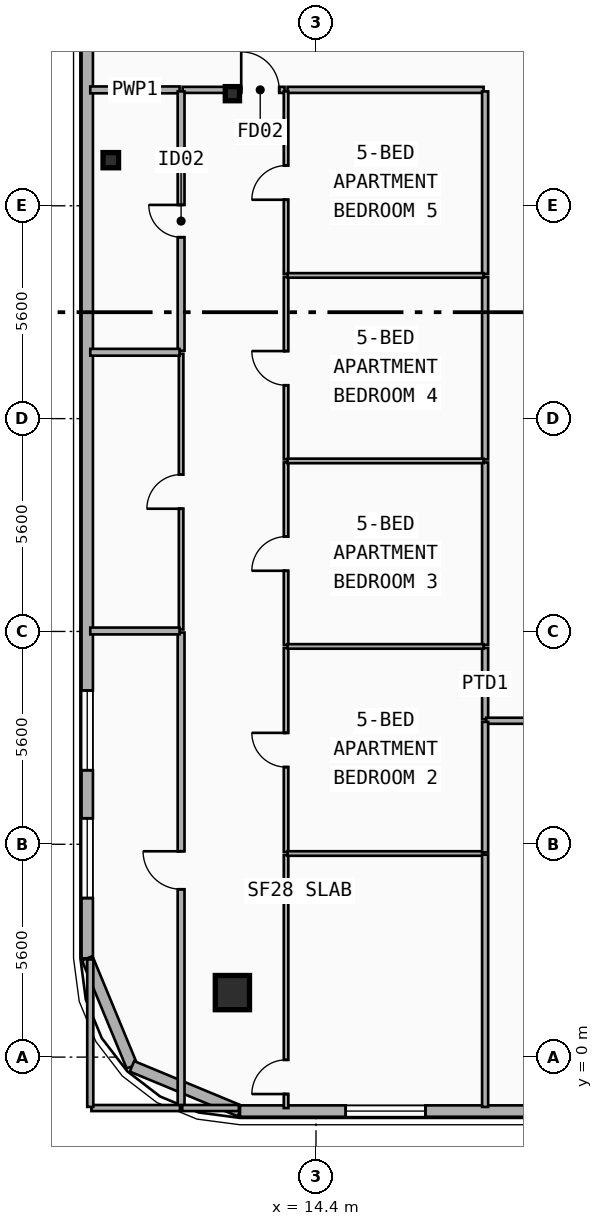
"""IFC4 building model, lengths in metres.
Left out: names, types, materials, properties, quantities, classifications, styles, units other than length and angle.
Written with IfcOpenShell. Run it as: python <this file> out.ifc"""

import sys

from ifc_helpers import new_model, si_unit, direction, frame, frame_2d, origin, origin_2d, place, context, subcontext, project, spatial, rectangle, i_section, extrude, element, fill, save


model = new_model("IFC4")
c1 = context("Model", 3, precision=1e-05, world=origin(), true_north=direction((0.0, 1.0)))
c2 = subcontext(c1, "Body", "Model", "MODEL_VIEW")
j1 = project(units=[si_unit("LENGTHUNIT", "METRE"), si_unit("PLANEANGLEUNIT", "RADIAN")], contexts=[c1])
p1 = place(None, origin())
s1 = spatial("IfcSite", under=j1, at=p1, CompositionType="ELEMENT")
p2 = place(p1, origin())
s2 = spatial("IfcBuilding", under=s1, at=p2, CompositionType="ELEMENT")
p3 = place(p2, frame((0.0, 0.0, 269.5)))
s3 = spatial("IfcBuildingStorey", under=s2, at=p3, CompositionType="ELEMENT", Elevation=269.5)
p4 = place(p3, frame((12.2, 25.35, 0.0), z_axis=(0.0, 0.0, 1.0), x_axis=(1.0, 0.0, 0.0)))
e1 = element("IfcColumn", 1, at=p4, inside=s3, PredefinedType="COLUMN", context=c2, shape_type="SweptSolid", body=[
    extrude(i_section(OverallWidth=0.374, OverallDepth=0.372, WebThickness=0.017, FlangeThickness=0.027, FilletRadius=0.015, at=origin_2d()), origin(), (0.0, 0.0, 1.0), 3.7),
])
p5 = place(p3, frame((12.2, 1.806, 0.0), z_axis=(0.0, -0.090227632116, 0.995921168769), x_axis=(1.0, 0.0, 0.0)))
e2 = element("IfcColumn", 2, at=p5, inside=s3, PredefinedType="COLUMN", context=c2, shape_type="SweptSolid", body=[
    extrude(rectangle(XDim=0.9, YDim=0.9, at=origin_2d()), origin(), (0.0, 0.0, 1.0), 3.715),
])
p6 = place(p3, frame((9.0, 23.6, 0.0), z_axis=(0.0, 0.0, 1.0), x_axis=(1.0, 0.0, 0.0)))
e3 = element("IfcColumn", 3, at=p6, inside=s3, PredefinedType="COLUMN", context=c2, shape_type="SweptSolid", body=[
    extrude(i_section(OverallWidth=0.408, OverallDepth=0.4, WebThickness=0.025, FlangeThickness=0.039, FilletRadius=0.015, at=origin_2d()), origin(), (0.0, 0.0, 1.0), 3.7),
])
p7 = place(p3, frame((8.38, 2.6, 0.0), z_axis=(0.0, 0.0, 1.0), x_axis=(0.0, 1.0, 0.0)))
e4 = element("IfcWall", 4, at=p7, inside=s3, PredefinedType="SOLIDWALL", context=c2, shape_type="SweptSolid", body=[
    extrude(rectangle(XDim=34.2, YDim=0.3, at=frame_2d((17.1, 0.0))), origin(), (0.0, 0.0, 1.0), 3.42),
])
p8 = place(p7, frame((1.584, 0.0, 0.75)))
e5 = element("IfcOpeningElement", 5, at=p8, cuts=e4, PredefinedType="OPENING", context=c2, shape_type="SweptSolid", body=[
    extrude(rectangle(XDim=2.1, YDim=2.1, at=frame_2d((1.05, 1.05))), frame((0.0, 0.16, 0.0), z_axis=(0.0, -1.0, 0.0), x_axis=(1.0, 0.0, 0.0)), (0.0, 0.0, 1.0), 0.32),
])
p9 = place(p7, frame((4.948, 0.0, 0.75)))
e6 = element("IfcOpeningElement", 6, at=p9, cuts=e4, PredefinedType="OPENING", context=c2, shape_type="SweptSolid", body=[
    extrude(rectangle(XDim=2.1, YDim=2.1, at=frame_2d((1.05, 1.05))), frame((0.0, 0.16, 0.0), z_axis=(0.0, -1.0, 0.0), x_axis=(1.0, 0.0, 0.0)), (0.0, 0.0, 1.0), 0.32),
])
p10 = place(p3, frame((9.557, -0.243, 0.0), z_axis=(0.0, 0.0, 1.0), x_axis=(-0.382676475685, 0.923882414032, 0.0)))
e7 = element("IfcWall", 7, at=p10, inside=s3, PredefinedType="SOLIDWALL", context=c2, shape_type="SweptSolid", body=[
    extrude(rectangle(XDim=3.077, YDim=0.3, at=frame_2d((1.539, 0.0))), origin(), (0.0, 0.0, 1.0), 3.42),
])
p11 = place(p3, frame((12.4, -1.42, 0.0), z_axis=(0.0, 0.0, 1.0), x_axis=(-0.92389884758, 0.382636798336, 0.0)))
e8 = element("IfcWall", 8, at=p11, inside=s3, PredefinedType="SOLIDWALL", context=c2, shape_type="SweptSolid", body=[
    extrude(rectangle(XDim=3.077, YDim=0.3, at=frame_2d((1.538, 0.0))), origin(), (0.0, 0.0, 1.0), 3.42),
])
p12 = place(p3, frame((45.2, -1.42, 0.0), z_axis=(0.0, 0.0, 1.0), x_axis=(-1.0, 0.0, 0.0)))
e9 = element("IfcWall", 9, at=p12, inside=s3, PredefinedType="SOLIDWALL", context=c2, shape_type="SweptSolid", body=[
    extrude(rectangle(XDim=32.8, YDim=0.3, at=frame_2d((16.4, 0.0))), origin(), (0.0, 0.0, 1.0), 3.42),
])
p13 = place(p12, frame((27.919, 0.0, 0.75)))
e10 = element("IfcOpeningElement", 10, at=p13, cuts=e9, PredefinedType="OPENING", context=c2, shape_type="SweptSolid", body=[
    extrude(rectangle(XDim=2.1, YDim=2.1, at=frame_2d((1.05, 1.05))), frame((0.0, 0.16, 0.0), z_axis=(0.0, -1.0, 0.0), x_axis=(1.0, 0.0, 0.0)), (0.0, 0.0, 1.0), 0.32),
])
p14 = place(p12, frame((15.75, 0.0, 0.75)))
e11 = element("IfcOpeningElement", 11, at=p14, cuts=e9, PredefinedType="OPENING", context=c2, shape_type="SweptSolid", body=[
    extrude(rectangle(XDim=2.1, YDim=2.1, at=frame_2d((1.05, 1.05))), frame((0.0, 0.16, 0.0), z_axis=(0.0, -1.0, 0.0), x_axis=(1.0, 0.0, 0.0)), (0.0, 0.0, 1.0), 0.32),
])
p15 = place(p12, frame((0.41, 0.0, 0.68)))
e12 = element("IfcOpeningElement", 12, at=p15, cuts=e9, PredefinedType="OPENING", context=c2, shape_type="SweptSolid", body=[
    extrude(rectangle(XDim=1.2, YDim=1.5, at=frame_2d((0.6, 0.75))), frame((0.0, 0.16, 0.0), z_axis=(0.0, -1.0, 0.0), x_axis=(1.0, 0.0, 0.0)), (0.0, 0.0, 1.0), 0.32),
])
p16 = place(p3, frame((10.89, 25.45, 0.0), z_axis=(0.0, 0.0, 1.0), x_axis=(1.0, 0.0, 0.0)))
e13 = element("IfcWall", 13, at=p16, inside=s3, PredefinedType="PARTITIONING", context=c2, shape_type="SweptSolid", body=[
    extrude(rectangle(XDim=2.682, YDim=0.16, at=frame_2d((1.341, 0.0))), origin(), (0.0, 0.0, 1.0), 2.7),
])
p17 = place(p16, frame((1.542, 0.0, 0.0)))
e14 = element("IfcOpeningElement", 14, at=p17, cuts=e13, PredefinedType="OPENING", context=c2, shape_type="SweptSolid", body=[
    extrude(rectangle(XDim=1.0, YDim=2.15, at=frame_2d((0.5, 1.075))), frame((0.0, 0.09, 0.0), z_axis=(0.0, -1.0, 0.0), x_axis=(1.0, 0.0, 0.0)), (0.0, 0.0, 1.0), 0.18),
])
p18 = place(p3, frame((8.46, 25.45, 0.0), z_axis=(0.0, 0.0, 1.0), x_axis=(1.0, 0.0, 0.0)))
e15 = element("IfcWall", 15, at=p18, inside=s3, PredefinedType="PLUMBINGWALL", context=c2, shape_type="SweptSolid", body=[
    extrude(rectangle(XDim=2.35, YDim=0.18, at=frame_2d((1.175, 0.0))), origin(), (0.0, 0.0, 1.0), 3.42),
])
p19 = place(p3, frame((13.652, 25.45, 0.0), z_axis=(0.0, 0.0, 1.0), x_axis=(1.0, 0.0, 0.0)))
e16 = element("IfcWall", 16, at=p19, inside=s3, PredefinedType="PARTITIONING", context=c2, shape_type="SweptSolid", body=[
    extrude(rectangle(XDim=5.158, YDim=0.16, at=frame_2d((2.579, 0.0))), origin(), (0.0, 0.0, 1.0), 3.42),
])
p20 = place(p3, frame((18.85, 8.89, 0.0), z_axis=(0.0, 0.0, 1.0), x_axis=(0.0, 1.0, 0.0)))
e17 = element("IfcWall", 17, at=p20, inside=s3, PredefinedType="PARTITIONING", context=c2, shape_type="SweptSolid", body=[
    extrude(rectangle(XDim=1.876, YDim=0.16, at=frame_2d((0.938, 0.0))), origin(), (0.0, 0.0, 1.0), 3.09),
])
p21 = place(p3, frame((18.85, 10.846, 0.0), z_axis=(0.0, 0.0, 1.0), x_axis=(0.0, 1.0, 0.0)))
e18 = element("IfcWall", 18, at=p21, inside=s3, PredefinedType="PARTITIONING", context=c2, shape_type="SweptSolid", body=[
    extrude(rectangle(XDim=4.801, YDim=0.16, at=frame_2d((2.4, 0.0))), origin(), (0.0, 0.0, 1.0), 2.96),
])
p22 = place(p3, frame((18.85, 15.727, 0.0), z_axis=(0.0, 0.0, 1.0), x_axis=(0.0, 1.0, 0.0)))
e19 = element("IfcWall", 19, at=p22, inside=s3, PredefinedType="PARTITIONING", context=c2, shape_type="SweptSolid", body=[
    extrude(rectangle(XDim=4.801, YDim=0.16, at=frame_2d((2.4, 0.0))), origin(), (0.0, 0.0, 1.0), 3.09),
])
p23 = place(p3, frame((18.85, 20.608, 0.0), z_axis=(0.0, 0.0, 1.0), x_axis=(0.0, 1.0, 0.0)))
e20 = element("IfcWall", 20, at=p23, inside=s3, PredefinedType="PARTITIONING", context=c2, shape_type="SweptSolid", body=[
    extrude(rectangle(XDim=4.802, YDim=0.16, at=frame_2d((2.401, 0.0))), origin(), (0.0, 0.0, 1.0), 2.96),
])
p24 = place(p3, frame((10.85, -1.34, 0.0), z_axis=(0.0, 0.0, 1.0), x_axis=(0.0, 1.0, 0.0)))
e21 = element("IfcWall", 21, at=p24, inside=s3, PredefinedType="PLUMBINGWALL", context=c2, shape_type="SweptSolid", body=[
    extrude(rectangle(XDim=12.512, YDim=0.18, at=frame_2d((6.256, 0.0))), origin(), (0.0, 0.0, 1.0), 3.42),
])
p25 = place(p24, frame((5.756, 0.0, 0.0)))
e22 = element("IfcOpeningElement", 22, at=p25, cuts=e21, PredefinedType="OPENING", context=c2, shape_type="SweptSolid", body=[
    extrude(rectangle(XDim=1.0, YDim=2.15, at=frame_2d((0.5, 1.075))), frame((0.0, 0.1, 0.0), z_axis=(0.0, -1.0, 0.0), x_axis=(1.0, 0.0, 0.0)), (0.0, 0.0, 1.0), 0.2),
])
p26 = place(p3, frame((10.85, 11.252, 0.0), z_axis=(0.0, 0.0, 1.0), x_axis=(0.0, 1.0, 0.0)))
e23 = element("IfcWall", 23, at=p26, inside=s3, PredefinedType="PARTITIONING", context=c2, shape_type="SweptSolid", body=[
    extrude(rectangle(XDim=7.254, YDim=0.12, at=frame_2d((3.627, 0.0))), origin(), (0.0, 0.0, 1.0), 3.42),
])
p27 = place(p26, frame((3.177, 0.0, 0.0)))
e24 = element("IfcOpeningElement", 24, at=p27, cuts=e23, PredefinedType="OPENING", context=c2, shape_type="SweptSolid", body=[
    extrude(rectangle(XDim=0.9, YDim=2.1, at=frame_2d((0.45, 1.05))), frame((0.0, 0.07, 0.0), z_axis=(0.0, -1.0, 0.0), x_axis=(1.0, 0.0, 0.0)), (0.0, 0.0, 1.0), 0.14),
])
p28 = place(p3, frame((10.85, 18.586, 0.0), z_axis=(0.0, 0.0, 1.0), x_axis=(0.0, 1.0, 0.0)))
e25 = element("IfcWall", 25, at=p28, inside=s3, PredefinedType="PLUMBINGWALL", context=c2, shape_type="SweptSolid", body=[
    extrude(rectangle(XDim=6.824, YDim=0.18, at=frame_2d((3.412, 0.0))), origin(), (0.0, 0.0, 1.0), 2.9),
])
p29 = place(p28, frame((2.987, 0.0, 0.0)))
e26 = element("IfcOpeningElement", 26, at=p29, cuts=e25, PredefinedType="OPENING", context=c2, shape_type="SweptSolid", body=[
    extrude(rectangle(XDim=0.85, YDim=2.1, at=frame_2d((0.425, 1.05))), frame((0.0, 0.1, 0.0), z_axis=(0.0, -1.0, 0.0), x_axis=(1.0, 0.0, 0.0)), (0.0, 0.0, 1.0), 0.2),
])
p30 = place(p3, frame((13.612, -1.34, 0.0), z_axis=(0.0, 0.0, 1.0), x_axis=(0.0, 1.0, 0.0)))
e27 = element("IfcWall", 27, at=p30, inside=s3, PredefinedType="PARTITIONING", context=c2, shape_type="SweptSolid", body=[
    extrude(rectangle(XDim=6.657, YDim=0.12, at=frame_2d((3.329, 0.0))), origin(), (0.0, 0.0, 1.0), 2.96),
])
p31 = place(p30, frame((0.368, 0.0, 0.0)))
e28 = element("IfcOpeningElement", 28, at=p31, cuts=e27, PredefinedType="OPENING", context=c2, shape_type="SweptSolid", body=[
    extrude(rectangle(XDim=0.9, YDim=2.1, at=frame_2d((0.45, 1.05))), frame((0.0, 0.07, 0.0), z_axis=(0.0, -1.0, 0.0), x_axis=(1.0, 0.0, 0.0)), (0.0, 0.0, 1.0), 0.14),
])
p32 = place(p3, frame((13.612, 5.397, 0.0), z_axis=(0.0, 0.0, 1.0), x_axis=(0.0, 1.0, 0.0)))
e29 = element("IfcWall", 29, at=p32, inside=s3, PredefinedType="PARTITIONING", context=c2, shape_type="SweptSolid", body=[
    extrude(rectangle(XDim=5.369, YDim=0.12, at=frame_2d((2.685, 0.0))), origin(), (0.0, 0.0, 1.0), 2.96),
])
p33 = place(p32, frame((2.235, 0.0, 0.0)))
e30 = element("IfcOpeningElement", 30, at=p33, cuts=e29, PredefinedType="OPENING", context=c2, shape_type="SweptSolid", body=[
    extrude(rectangle(XDim=0.9, YDim=2.1, at=frame_2d((0.45, 1.05))), frame((0.0, 0.07, 0.0), z_axis=(0.0, -1.0, 0.0), x_axis=(1.0, 0.0, 0.0)), (0.0, 0.0, 1.0), 0.14),
])
p34 = place(p3, frame((13.612, 10.846, 0.0), z_axis=(0.0, 0.0, 1.0), x_axis=(0.0, 1.0, 0.0)))
e31 = element("IfcWall", 31, at=p34, inside=s3, PredefinedType="PARTITIONING", context=c2, shape_type="SweptSolid", body=[
    extrude(rectangle(XDim=4.801, YDim=0.12, at=frame_2d((2.4, 0.0))), origin(), (0.0, 0.0, 1.0), 2.96),
])
p35 = place(p34, frame((1.95, 0.0, 0.0)))
e32 = element("IfcOpeningElement", 32, at=p35, cuts=e31, PredefinedType="OPENING", context=c2, shape_type="SweptSolid", body=[
    extrude(rectangle(XDim=0.9, YDim=2.1, at=frame_2d((0.45, 1.05))), frame((0.0, 0.07, 0.0), z_axis=(0.0, -1.0, 0.0), x_axis=(1.0, 0.0, 0.0)), (0.0, 0.0, 1.0), 0.14),
])
p36 = place(p3, frame((13.612, 15.727, 0.0), z_axis=(0.0, 0.0, 1.0), x_axis=(0.0, 1.0, 0.0)))
e33 = element("IfcWall", 33, at=p36, inside=s3, PredefinedType="PARTITIONING", context=c2, shape_type="SweptSolid", body=[
    extrude(rectangle(XDim=4.801, YDim=0.12, at=frame_2d((2.4, 0.0))), origin(), (0.0, 0.0, 1.0), 3.09),
])
p37 = place(p36, frame((1.95, 0.0, 0.0)))
e34 = element("IfcOpeningElement", 34, at=p37, cuts=e33, PredefinedType="OPENING", context=c2, shape_type="SweptSolid", body=[
    extrude(rectangle(XDim=0.9, YDim=2.1, at=frame_2d((0.45, 1.05))), frame((0.0, 0.07, 0.0), z_axis=(0.0, -1.0, 0.0), x_axis=(1.0, 0.0, 0.0)), (0.0, 0.0, 1.0), 0.14),
])
p38 = place(p3, frame((13.612, 20.608, 0.0), z_axis=(0.0, 0.0, 1.0), x_axis=(0.0, 1.0, 0.0)))
e35 = element("IfcWall", 35, at=p38, inside=s3, PredefinedType="PARTITIONING", context=c2, shape_type="SweptSolid", body=[
    extrude(rectangle(XDim=4.802, YDim=0.12, at=frame_2d((2.401, 0.0))), origin(), (0.0, 0.0, 1.0), 2.96),
])
p39 = place(p38, frame((1.951, 0.0, 0.0)))
e36 = element("IfcOpeningElement", 36, at=p39, cuts=e35, PredefinedType="OPENING", context=c2, shape_type="SweptSolid", body=[
    extrude(rectangle(XDim=0.9, YDim=2.1, at=frame_2d((0.45, 1.05))), frame((0.0, 0.07, 0.0), z_axis=(0.0, -1.0, 0.0), x_axis=(1.0, 0.0, 0.0)), (0.0, 0.0, 1.0), 0.14),
])
for number, where, z_axis, x_axis in (
    (37, (8.46, 11.212, 0.0), (0.0, 0.0, 1.0), (1.0, 0.0, 0.0)),
    (38, (8.46, 18.546, 0.0), (0.0, 0.0, 1.0), (1.0, 0.0, 0.0)),
):
    element("IfcWall", number, at=place(p3, frame(where, z_axis=z_axis, x_axis=x_axis)), inside=s3, PredefinedType="PLUMBINGWALL", context=c2, shape_type="SweptSolid", body=[
        extrude(rectangle(XDim=2.35, YDim=0.18, at=frame_2d((1.175, 0.0))), origin(), (0.0, 0.0, 1.0), 3.42),
    ])
p40 = place(p3, frame((13.652, 5.357, 0.0), z_axis=(0.0, 0.0, 1.0), x_axis=(1.0, 0.0, 0.0)))
e39 = element("IfcWall", 39, at=p40, inside=s3, PredefinedType="PARTITIONING", context=c2, shape_type="SweptSolid", body=[
    extrude(rectangle(XDim=5.158, YDim=0.12, at=frame_2d((2.579, 0.0))), origin(), (0.0, 0.0, 1.0), 2.96),
])
for number, where, z_axis, x_axis in (
    (40, (13.652, 10.806, 0.0), (0.0, 0.0, 1.0), (1.0, 0.0, 0.0)),
    (41, (13.652, 15.687, 0.0), (0.0, 0.0, 1.0), (1.0, 0.0, 0.0)),
    (42, (13.652, 20.568, 0.0), (0.0, 0.0, 1.0), (1.0, 0.0, 0.0)),
):
    element("IfcWall", number, at=place(p3, frame(where, z_axis=z_axis, x_axis=x_axis)), inside=s3, PredefinedType="PARTITIONING", context=c2, shape_type="SweptSolid", body=[
        extrude(rectangle(XDim=5.158, YDim=0.12, at=frame_2d((2.579, 0.0))), origin(), (0.0, 0.0, 1.0), 3.42),
    ])
p41 = place(p3, frame((18.88, 8.85, 0.0), z_axis=(0.0, 0.0, 1.0), x_axis=(1.0, 0.0, 0.0)))
e43 = element("IfcWall", 43, at=p41, inside=s3, PredefinedType="PARTITIONING", context=c2, shape_type="SweptSolid", body=[
    extrude(rectangle(XDim=1.54, YDim=0.16, at=frame_2d((0.77, 0.0))), origin(), (0.0, 0.0, 1.0), 3.42),
])
p42 = place(p3, frame((10.88, -1.34, 0.0), z_axis=(0.0, 0.0, 1.0), x_axis=(1.0, 0.0, 0.0)))
e44 = element("IfcWall", 44, at=p42, inside=s3, PredefinedType="PARTITIONING", context=c2, shape_type="SweptSolid", body=[
    extrude(rectangle(XDim=1.49, YDim=0.16, at=frame_2d((0.745, 0.0))), origin(), (0.0, 0.0, 1.0), 3.42),
])
p43 = place(p3, frame((8.49, -1.34, 0.0), z_axis=(0.0, 0.0, 1.0), x_axis=(1.0, 0.0, 0.0)))
e45 = element("IfcWall", 45, at=p43, inside=s3, PredefinedType="PARTITIONING", context=c2, shape_type="SweptSolid", body=[
    extrude(rectangle(XDim=2.33, YDim=0.16, at=frame_2d((1.165, 0.0))), origin(), (0.0, 0.0, 1.0), 3.42),
])
p44 = place(p3, frame((8.46, -1.31, 0.0), z_axis=(0.0, 0.0, 1.0), x_axis=(0.0, 1.0, 0.0)))
e46 = element("IfcWall", 46, at=p44, inside=s3, PredefinedType="PARTITIONING", context=c2, shape_type="SweptSolid", body=[
    extrude(rectangle(XDim=3.88, YDim=0.16, at=frame_2d((1.94, 0.0))), origin(), (0.0, 0.0, 1.0), 3.42),
])
p45 = place(p3, frame((18.85, -1.31, 0.0), z_axis=(0.0, 0.0, 1.0), x_axis=(0.0, 1.0, 0.0)))
e47 = element("IfcWall", 47, at=p45, inside=s3, PredefinedType="PARTITIONING", context=c2, shape_type="SweptSolid", body=[
    extrude(rectangle(XDim=6.637, YDim=0.16, at=frame_2d((3.318, 0.0))), origin(), (0.0, 0.0, 1.0), 2.96),
])
p46 = place(p3, frame((18.85, 5.387, 0.0), z_axis=(0.0, 0.0, 1.0), x_axis=(0.0, 1.0, 0.0)))
e48 = element("IfcWall", 48, at=p46, inside=s3, PredefinedType="PARTITIONING", context=c2, shape_type="SweptSolid", body=[
    extrude(rectangle(XDim=3.433, YDim=0.16, at=frame_2d((1.717, 0.0))), origin(), (0.0, 0.0, 1.0), 2.96),
])
p47 = place(p8, origin())
e49 = element("IfcWindow", 49, at=p47, inside=s3, PartitioningType="SINGLE_PANEL", PredefinedType="WINDOW", context=c2, shape_type="SweptSolid", body=[
    extrude(rectangle(XDim=2.1, YDim=2.1, at=frame_2d((1.05, 1.05))), frame((0.0, 0.03, 0.0), z_axis=(0.0, -1.0, 0.0), x_axis=(1.0, 0.0, 0.0)), (0.0, 0.0, 1.0), 0.06),
])
fill(e5, e49)
p48 = place(p9, origin())
e50 = element("IfcWindow", 50, at=p48, inside=s3, PartitioningType="SINGLE_PANEL", PredefinedType="WINDOW", context=c2, shape_type="SweptSolid", body=[
    extrude(rectangle(XDim=2.1, YDim=2.1, at=frame_2d((1.05, 1.05))), frame((0.0, 0.03, 0.0), z_axis=(0.0, -1.0, 0.0), x_axis=(1.0, 0.0, 0.0)), (0.0, 0.0, 1.0), 0.06),
])
fill(e6, e50)
p49 = place(p13, origin())
e51 = element("IfcWindow", 51, at=p49, inside=s3, PartitioningType="SINGLE_PANEL", PredefinedType="WINDOW", context=c2, shape_type="SweptSolid", body=[
    extrude(rectangle(XDim=2.1, YDim=2.1, at=frame_2d((1.05, 1.05))), frame((0.0, 0.03, 0.0), z_axis=(0.0, -1.0, 0.0), x_axis=(1.0, 0.0, 0.0)), (0.0, 0.0, 1.0), 0.06),
])
fill(e10, e51)
p50 = place(p17, origin())
e52 = element("IfcDoor", 52, at=p50, inside=s3, OperationType="SINGLE_SWING_LEFT", PredefinedType="DOOR", context=c2, shape_type="SweptSolid", body=[
    extrude(rectangle(XDim=1.0, YDim=2.15, at=frame_2d((0.5, 1.075))), frame((0.0, 0.025, 0.0), z_axis=(0.0, -1.0, 0.0), x_axis=(1.0, 0.0, 0.0)), (0.0, 0.0, 1.0), 0.05),
])
fill(e14, e52)
p51 = place(p25, origin())
e53 = element("IfcDoor", 53, at=p51, inside=s3, OperationType="SINGLE_SWING_RIGHT", PredefinedType="DOOR", context=c2, shape_type="SweptSolid", body=[
    extrude(rectangle(XDim=1.0, YDim=2.15, at=frame_2d((0.5, 1.075))), frame((0.0, 0.025, 0.0), z_axis=(0.0, -1.0, 0.0), x_axis=(1.0, 0.0, 0.0)), (0.0, 0.0, 1.0), 0.05),
])
fill(e22, e53)
p52 = place(p27, origin())
e54 = element("IfcDoor", 54, at=p52, inside=s3, OperationType="SINGLE_SWING_LEFT", PredefinedType="DOOR", context=c2, shape_type="SweptSolid", body=[
    extrude(rectangle(XDim=0.9, YDim=2.1, at=frame_2d((0.45, 1.05))), frame((0.0, 0.025, 0.0), z_axis=(0.0, -1.0, 0.0), x_axis=(1.0, 0.0, 0.0)), (0.0, 0.0, 1.0), 0.05),
])
fill(e24, e54)
p53 = place(p29, origin())
e55 = element("IfcDoor", 55, at=p53, inside=s3, OperationType="SINGLE_SWING_RIGHT", PredefinedType="DOOR", context=c2, shape_type="SweptSolid", body=[
    extrude(rectangle(XDim=0.85, YDim=2.1, at=frame_2d((0.425, 1.05))), frame((0.0, 0.025, 0.0), z_axis=(0.0, -1.0, 0.0), x_axis=(1.0, 0.0, 0.0)), (0.0, 0.0, 1.0), 0.05),
])
fill(e26, e55)
p54 = place(p31, origin())
e56 = element("IfcDoor", 56, at=p54, inside=s3, OperationType="SINGLE_SWING_LEFT", PredefinedType="DOOR", context=c2, shape_type="SweptSolid", body=[
    extrude(rectangle(XDim=0.9, YDim=2.1, at=frame_2d((0.45, 1.05))), frame((0.0, 0.025, 0.0), z_axis=(0.0, -1.0, 0.0), x_axis=(1.0, 0.0, 0.0)), (0.0, 0.0, 1.0), 0.05),
])
fill(e28, e56)
p55 = place(p33, origin())
e57 = element("IfcDoor", 57, at=p55, inside=s3, OperationType="SINGLE_SWING_RIGHT", PredefinedType="DOOR", context=c2, shape_type="SweptSolid", body=[
    extrude(rectangle(XDim=0.9, YDim=2.1, at=frame_2d((0.45, 1.05))), frame((0.0, 0.025, 0.0), z_axis=(0.0, -1.0, 0.0), x_axis=(1.0, 0.0, 0.0)), (0.0, 0.0, 1.0), 0.05),
])
fill(e30, e57)
p56 = place(p35, origin())
e58 = element("IfcDoor", 58, at=p56, inside=s3, OperationType="SINGLE_SWING_LEFT", PredefinedType="DOOR", context=c2, shape_type="SweptSolid", body=[
    extrude(rectangle(XDim=0.9, YDim=2.1, at=frame_2d((0.45, 1.05))), frame((0.0, 0.025, 0.0), z_axis=(0.0, -1.0, 0.0), x_axis=(1.0, 0.0, 0.0)), (0.0, 0.0, 1.0), 0.05),
])
fill(e32, e58)
p57 = place(p37, origin())
e59 = element("IfcDoor", 59, at=p57, inside=s3, OperationType="SINGLE_SWING_RIGHT", PredefinedType="DOOR", context=c2, shape_type="SweptSolid", body=[
    extrude(rectangle(XDim=0.9, YDim=2.1, at=frame_2d((0.45, 1.05))), frame((0.0, 0.025, 0.0), z_axis=(0.0, -1.0, 0.0), x_axis=(1.0, 0.0, 0.0)), (0.0, 0.0, 1.0), 0.05),
])
fill(e34, e59)
p58 = place(p39, origin())
e60 = element("IfcDoor", 60, at=p58, inside=s3, OperationType="SINGLE_SWING_LEFT", PredefinedType="DOOR", context=c2, shape_type="SweptSolid", body=[
    extrude(rectangle(XDim=0.9, YDim=2.1, at=frame_2d((0.45, 1.05))), frame((0.0, 0.025, 0.0), z_axis=(0.0, -1.0, 0.0), x_axis=(1.0, 0.0, 0.0)), (0.0, 0.0, 1.0), 0.05),
])
fill(e36, e60)
save(model, sys.argv[1])
